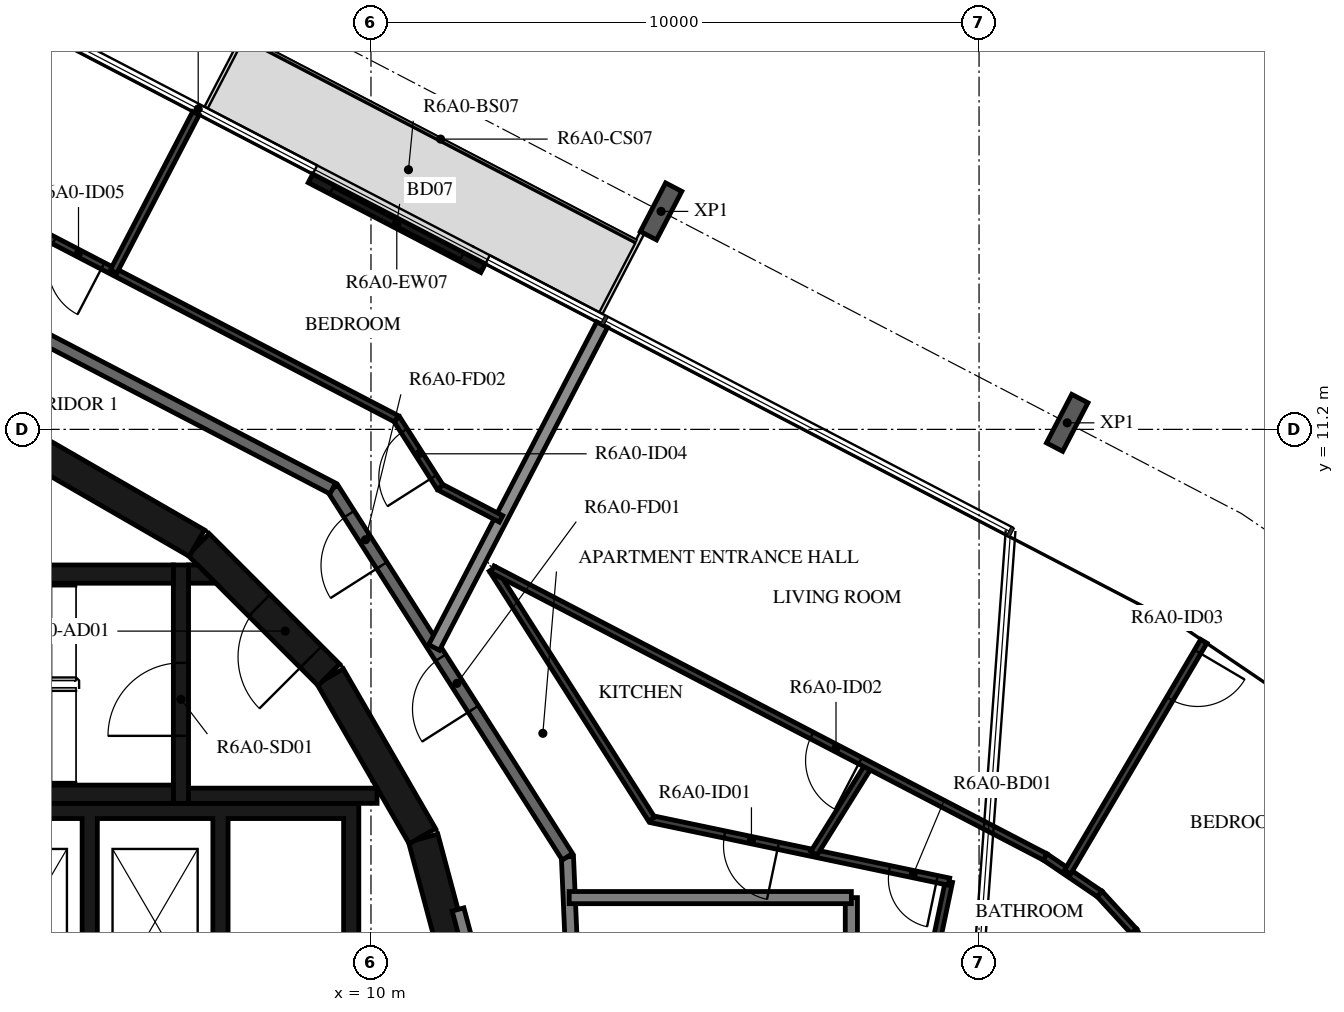
"""IFC4 building model, lengths in metres.
Left out: names, types, materials, properties, quantities, classifications, styles, units other than length and angle.
Written with IfcOpenShell. Run it as: python <this file> out.ifc"""

import sys

from ifc_helpers import new_model, si_unit, direction, frame, frame_2d, origin, origin_2d, place, context, subcontext, project, spatial, polyline, rectangle, i_section, outline, extrude, element, fill, save


model = new_model("IFC4")
c1 = context("Model", 3, precision=1e-05, world=origin(), true_north=direction((0.0, 1.0)))
c2 = subcontext(c1, "Body", "Model", "MODEL_VIEW")
j1 = project(units=[si_unit("LENGTHUNIT", "METRE"), si_unit("PLANEANGLEUNIT", "RADIAN")], contexts=[c1])
p1 = place(None, origin())
s1 = spatial("IfcSite", under=j1, at=p1, CompositionType="ELEMENT")
p2 = place(p1, origin())
s2 = spatial("IfcBuilding", under=s1, at=p2, CompositionType="ELEMENT")
p3 = place(p2, frame((0.0, 0.0, 233.7)))
s3 = spatial("IfcBuildingStorey", under=s2, at=p3, CompositionType="ELEMENT", Elevation=233.7)
for number, where, z_axis, x_axis in (
    (1, (21.45, 11.308, -0.38), (0.0, 0.0, 1.0), (0.887, -0.462, 0.0)),
    (2, (14.771, 14.784, -0.38), (0.0, 0.0, 1.0), (0.887, -0.462, 0.0)),
):
    element("IfcColumn", number, at=place(p3, frame(where, z_axis=z_axis, x_axis=x_axis)), inside=s3, PredefinedType="COLUMN", context=c2, shape_type="SweptSolid", body=[
        extrude(i_section(OverallWidth=0.3, OverallDepth=0.9, WebThickness=0.019, FlangeThickness=0.035, FilletRadius=0.03, at=origin_2d()), origin(), (0.0, 0.0, 1.0), 3.5),
    ])
p4 = place(p3, frame((11.844, 13.851, 0.0), z_axis=(0.0, 0.0, 1.0), x_axis=(-0.887014349583, 0.461741858221, 0.0)))
e3 = element("IfcWall", 3, at=p4, inside=s3, PredefinedType="STANDARD", context=c2, shape_type="SweptSolid", body=[
    extrude(rectangle(XDim=3.2, YDim=0.16, at=frame_2d((1.6, 0.0))), origin(), (0.0, 0.0, 1.0), 3.12),
])
p5 = place(p4, frame((0.4, 0.0, 0.0)))
e4 = element("IfcOpeningElement", 4, at=p5, cuts=e3, PredefinedType="OPENING", context=c2, shape_type="SweptSolid", body=[
    extrude(rectangle(XDim=2.4, YDim=2.4, at=frame_2d((1.2, 1.2))), frame((0.0, 0.09, 0.0), z_axis=(0.0, -1.0, 0.0), x_axis=(1.0, 0.0, 0.0)), (0.0, 0.0, 1.0), 0.18),
])
for number, where, z_axis, x_axis in (
    (5, (11.643, 1.55, 0.0), (0.0, 0.0, 1.0), (-0.259, 0.966, 0.0)),
    (6, (10.845, 4.51, 0.0), (0.0, 0.0, 1.0), (-0.5, 0.866, 0.0)),
):
    element("IfcWall", number, at=place(p3, frame(where, z_axis=z_axis, x_axis=x_axis)), inside=s3, PredefinedType="SHEAR", context=c2, shape_type="SweptSolid", body=[
        extrude(rectangle(XDim=3.033, YDim=0.5, at=frame_2d((1.516, 0.0))), origin(), (0.0, 0.0, 1.0), 3.12),
    ])
p6 = place(p3, frame((9.308, 7.164, 0.0), z_axis=(0.0, 0.0, 1.0), x_axis=(-0.707106781187, 0.707106781187, 0.0)))
e7 = element("IfcWall", 7, at=p6, inside=s3, PredefinedType="SHEAR", context=c2, shape_type="SweptSolid", body=[
    extrude(rectangle(XDim=3.032, YDim=0.5, at=frame_2d((1.516, 0.0))), origin(), (0.0, 0.0, 1.0), 3.12),
])
p7 = place(p6, frame((0.416, 0.0, 0.0)))
e8 = element("IfcOpeningElement", 8, at=p7, cuts=e7, PredefinedType="OPENING", context=c2, shape_type="SweptSolid", body=[
    extrude(rectangle(XDim=1.2, YDim=2.1, at=frame_2d((0.6, 1.05))), frame((0.0, 0.26, 0.0), z_axis=(0.0, -1.0, 0.0), x_axis=(1.0, 0.0, 0.0)), (0.0, 0.0, 1.0), 0.52),
])
p8 = place(p3, frame((7.137, 9.329, 0.0), z_axis=(0.0, 0.0, 1.0), x_axis=(-0.865975092491, 0.500087131594, 0.0)))
e9 = element("IfcWall", 9, at=p8, inside=s3, PredefinedType="SHEAR", context=c2, shape_type="SweptSolid", body=[
    extrude(rectangle(XDim=3.033, YDim=0.5, at=frame_2d((1.516, 0.0))), origin(), (0.0, 0.0, 1.0), 3.12),
])
for number, where, z_axis, x_axis in (
    (10, (0.0, 5.2, 0.0), (0.0, 0.0, 1.0), (1.0, 0.0, 0.0)),
    (11, (0.0, 8.82, 0.0), (0.0, 0.0, 1.0), (1.0, 0.0, 0.0)),
):
    element("IfcWall", number, at=place(p3, frame(where, z_axis=z_axis, x_axis=x_axis)), inside=s3, PredefinedType="SHEAR", context=c2, shape_type="SweptSolid", body=[
        extrude(rectangle(XDim=6.75, YDim=0.3, at=frame_2d((3.375, 0.0))), origin(), (0.0, 0.0, 1.0), 3.12),
    ])
p9 = place(p3, frame((6.875, 5.05, 0.0), z_axis=(0.0, 0.0, 1.0), x_axis=(0.0, 1.0, 0.0)))
e12 = element("IfcWall", 12, at=p9, inside=s3, PredefinedType="SHEAR", context=c2, shape_type="SweptSolid", body=[
    extrude(rectangle(XDim=3.92, YDim=0.25, at=frame_2d((1.96, 0.0))), origin(), (0.0, 0.0, 1.0), 3.12),
])
p10 = place(p9, frame((1.11, 0.0, 0.0)))
e13 = element("IfcOpeningElement", 13, at=p10, cuts=e12, PredefinedType="OPENING", context=c2, shape_type="SweptSolid", body=[
    extrude(rectangle(XDim=1.2, YDim=2.1, at=frame_2d((0.6, 1.05))), frame((0.0, 0.135, 0.0), z_axis=(0.0, -1.0, 0.0), x_axis=(1.0, 0.0, 0.0)), (0.0, 0.0, 1.0), 0.27),
])
p11 = place(p3, frame((7.0, 5.175, 0.0), z_axis=(0.0, 0.0, 1.0), x_axis=(1.0, 0.0, 0.0)))
e14 = element("IfcWall", 14, at=p11, inside=s3, PredefinedType="SHEAR", context=c2, shape_type="SweptSolid", body=[
    extrude(rectangle(XDim=3.1, YDim=0.25, at=frame_2d((1.55, 0.0))), origin(), (0.0, 0.0, 1.0), 3.12),
])
p12 = place(p3, origin())
e15 = element("IfcWall", 15, at=p12, inside=s3, PredefinedType="SHEAR", context=c2, shape_type="SweptSolid", body=[
    extrude(outline(polyline([(7.448, 8.67), (7.0, 8.67), (7.0, 8.97), (7.148, 8.97), (7.448, 8.67)])), origin(), (0.0, 0.0, 1.0), 3.12),
])
p13 = place(p3, origin())
e16 = element("IfcWall", 16, at=p13, inside=s3, PredefinedType="SHEAR", context=c2, shape_type="SweptSolid", body=[
    extrude(outline(polyline([(-9.55, 4.8), (-5.5, 4.8), (-5.5, 1.9), (-5.25, 1.9), (-5.25, 4.8), (-1.2, 4.8), (-1.2, 1.9), (-0.95, 1.9), (-0.95, 4.8), (0.95, 4.8), (0.95, 1.9), (1.2, 1.9), (1.2, 4.8), (3.1, 4.8), (3.1, 1.9), (3.35, 1.9), (3.35, 4.8), (5.25, 4.8), (5.25, 1.9), (5.5, 1.9), (5.5, 4.8), (7.4, 4.8), (7.4, 1.9), (7.65, 1.9), (7.65, 4.8), (9.55, 4.8), (9.55, 1.9), (9.8, 1.9), (9.8, 4.8), (9.8, 5.05), (-9.8, 5.05), (-9.8, 4.8), (-9.8, 1.9), (-9.55, 1.9), (-9.55, 4.8)])), origin(), (0.0, 0.0, 1.0), 3.12),
])
p14 = place(p3, frame((11.87, 1.668, 0.0), z_axis=(0.0, 0.0, 1.0), x_axis=(-0.258836880648, 0.965921047093, 0.0)))
e17 = element("IfcWall", 17, at=p14, inside=s3, PredefinedType="STANDARD", context=c2, shape_type="SweptSolid", body=[
    extrude(rectangle(XDim=1.695, YDim=0.2, at=frame_2d((0.848, 0.0))), origin(), (0.0, 0.0, 1.0), 3.12),
])
p15 = place(p3, frame((13.331, 1.874, 0.0), z_axis=(0.0, 0.0, 1.0), x_axis=(-0.043621457762, 0.999048131184, 0.0)))
e18 = element("IfcWall", 18, at=p15, inside=s3, PredefinedType="STANDARD", context=c2, shape_type="SweptSolid", body=[
    extrude(rectangle(XDim=2.3, YDim=0.2, at=frame_2d((1.15, 0.0))), origin(), (0.0, 0.0, 1.0), 3.12),
])
p16 = place(p3, frame((13.231, 4.172, 0.0), z_axis=(0.0, 0.0, 1.0), x_axis=(-0.537304397561, 0.843388394728, 0.0)))
e19 = element("IfcWall", 19, at=p16, inside=s3, PredefinedType="STANDARD", context=c2, shape_type="SweptSolid", body=[
    extrude(rectangle(XDim=7.181, YDim=0.2, at=frame_2d((3.59, 0.0))), origin(), (0.0, 0.0, 1.0), 3.12),
])
p17 = place(p16, frame((2.881, 0.0, 0.0)))
e20 = element("IfcOpeningElement", 20, at=p17, cuts=e19, PredefinedType="OPENING", context=c2, shape_type="SweptSolid", body=[
    extrude(rectangle(XDim=1.0, YDim=2.1, at=frame_2d((0.5, 1.05))), frame((0.0, 0.11, 0.0), z_axis=(0.0, -1.0, 0.0), x_axis=(1.0, 0.0, 0.0)), (0.0, 0.0, 1.0), 0.22),
])
p18 = place(p16, frame((5.681, 0.0, 0.0)))
e21 = element("IfcOpeningElement", 21, at=p18, cuts=e19, PredefinedType="OPENING", context=c2, shape_type="SweptSolid", body=[
    extrude(rectangle(XDim=1.0, YDim=2.1, at=frame_2d((0.5, 1.05))), frame((0.0, 0.11, 0.0), z_axis=(0.0, -1.0, 0.0), x_axis=(1.0, 0.0, 0.0)), (0.0, 0.0, 1.0), 0.22),
])
p19 = place(p3, frame((9.372, 10.228, 0.0), z_axis=(0.0, 0.0, 1.0), x_axis=(-0.887005184532, 0.461759464021, 0.0)))
e22 = element("IfcWall", 22, at=p19, inside=s3, PredefinedType="STANDARD", context=c2, shape_type="SweptSolid", body=[
    extrude(rectangle(XDim=7.181, YDim=0.2, at=frame_2d((3.591, 0.0))), origin(), (0.0, 0.0, 1.0), 3.12),
])
p20 = place(p3, frame((17.9, -1.772, 0.0), z_axis=(0.0, 0.0, 1.0), x_axis=(0.0, 1.0, 0.0)))
e23 = element("IfcWall", 23, at=p20, inside=s3, PredefinedType="STANDARD", context=c2, shape_type="SweptSolid", body=[
    extrude(rectangle(XDim=5.272, YDim=0.2, at=frame_2d((2.636, 0.0))), origin(), (0.0, 0.0, 1.0), 3.12),
])
p21 = place(p3, frame((17.9, 3.5, 0.0), z_axis=(0.0, 0.0, 1.0), x_axis=(-1.0, 0.0, 0.0)))
e24 = element("IfcWall", 24, at=p21, inside=s3, PredefinedType="STANDARD", context=c2, shape_type="SweptSolid", body=[
    extrude(rectangle(XDim=4.64, YDim=0.2, at=frame_2d((2.32, 0.0))), origin(), (0.0, 0.0, 1.0), 3.12),
])
p22 = place(p3, frame((13.801, 12.922, 0.0), z_axis=(0.0, 0.0, 1.0), x_axis=(-0.461726485624, -0.887022351733, 0.0)))
e25 = element("IfcWall", 25, at=p22, inside=s3, PredefinedType="STANDARD", context=c2, shape_type="SweptSolid", body=[
    extrude(rectangle(XDim=5.984, YDim=0.2, at=frame_2d((2.992, 0.0))), origin(), (0.0, 0.0, 1.0), 2.73),
])
p23 = place(p3, frame((19.199, 2.308, 0.0), z_axis=(0.0, 0.0, 1.0), x_axis=(0.205580140246, 0.978640284239, 0.0)))
e26 = element("IfcWall", 26, at=p23, inside=s3, PredefinedType="PARTITIONING", context=c2, shape_type="SweptSolid", body=[
    extrude(rectangle(XDim=1.487, YDim=0.12, at=frame_2d((0.743, 0.0))), origin(), (0.0, 0.0, 1.0), 3.12),
])
p24 = place(p3, frame((19.505, 3.763, 0.0), z_axis=(0.0, 0.0, 1.0), x_axis=(-0.978660081285, 0.205485876157, 0.0)))
e27 = element("IfcWall", 27, at=p24, inside=s3, PredefinedType="PARTITIONING", context=c2, shape_type="SweptSolid", body=[
    extrude(rectangle(XDim=4.996, YDim=0.12, at=frame_2d((2.498, 0.0))), origin(), (0.0, 0.0, 1.0), 3.12),
])
p25 = place(p24, frame((0.2, 0.0, 0.0)))
e28 = element("IfcOpeningElement", 28, at=p25, cuts=e27, PredefinedType="OPENING", context=c2, shape_type="SweptSolid", body=[
    extrude(rectangle(XDim=0.8, YDim=2.1, at=frame_2d((0.4, 1.05))), frame((0.0, 0.07, 0.0), z_axis=(0.0, -1.0, 0.0), x_axis=(1.0, 0.0, 0.0)), (0.0, 0.0, 1.0), 0.14),
])
p26 = place(p24, frame((2.869, 0.0, 0.0)))
e29 = element("IfcOpeningElement", 29, at=p26, cuts=e27, PredefinedType="OPENING", context=c2, shape_type="SweptSolid", body=[
    extrude(rectangle(XDim=0.9, YDim=2.1, at=frame_2d((0.45, 1.05))), frame((0.0, 0.07, 0.0), z_axis=(0.0, -1.0, 0.0), x_axis=(1.0, 0.0, 0.0)), (0.0, 0.0, 1.0), 0.14),
])
p27 = place(p3, frame((14.615, 4.79, 0.0), z_axis=(0.0, 0.0, 1.0), x_axis=(-0.537312928062, 0.843382960071, 0.0)))
e30 = element("IfcWall", 30, at=p27, inside=s3, PredefinedType="PARTITIONING", context=c2, shape_type="SweptSolid", body=[
    extrude(rectangle(XDim=4.875, YDim=0.12, at=frame_2d((2.437, 0.0))), origin(), (0.0, 0.0, 1.0), 3.12),
])
p28 = place(p3, frame((21.085, 4.169, 0.0), z_axis=(0.0, 0.0, 1.0), x_axis=(0.827390024541, -0.561627765776, 0.0)))
e31 = element("IfcWall", 31, at=p28, inside=s3, PredefinedType="PARTITIONING", context=c2, shape_type="SweptSolid", body=[
    extrude(rectangle(XDim=1.087, YDim=0.12, at=frame_2d((0.543, 0.0))), origin(), (0.0, 0.0, 1.0), 3.12),
])
p29 = place(p3, frame((21.984, 3.559, 0.0), z_axis=(0.0, 0.0, 1.0), x_axis=(0.675497816835, -0.737361986715, 0.0)))
e32 = element("IfcWall", 32, at=p29, inside=s3, PredefinedType="PARTITIONING", context=c2, shape_type="SweptSolid", body=[
    extrude(rectangle(XDim=0.829, YDim=0.12, at=frame_2d((0.415, 0.0))), origin(), (0.0, 0.0, 1.0), 3.12),
])
p30 = place(p3, frame((22.544, 2.948, 0.0), z_axis=(0.0, 0.0, 1.0), x_axis=(0.487392269075, -0.873183128585, 0.0)))
e33 = element("IfcWall", 33, at=p30, inside=s3, PredefinedType="PARTITIONING", context=c2, shape_type="SweptSolid", body=[
    extrude(rectangle(XDim=0.829, YDim=0.12, at=frame_2d((0.415, 0.0))), origin(), (0.0, 0.0, 1.0), 3.12),
])
p31 = place(p3, frame((23.696, 7.715, 0.0), z_axis=(0.0, 0.0, 1.0), x_axis=(-0.508219920645, -0.861227329025, 0.0)))
e34 = element("IfcWall", 34, at=p31, inside=s3, PredefinedType="PARTITIONING", context=c2, shape_type="SweptSolid", body=[
    extrude(rectangle(XDim=4.409, YDim=0.12, at=frame_2d((2.205, 0.0))), origin(), (0.0, 0.0, 1.0), 3.12),
])
p32 = place(p31, frame((0.2, 0.0, 0.0)))
e35 = element("IfcOpeningElement", 35, at=p32, cuts=e34, PredefinedType="OPENING", context=c2, shape_type="SweptSolid", body=[
    extrude(rectangle(XDim=0.9, YDim=2.1, at=frame_2d((0.45, 1.05))), frame((0.0, 0.07, 0.0), z_axis=(0.0, -1.0, 0.0), x_axis=(1.0, 0.0, 0.0)), (0.0, 0.0, 1.0), 0.14),
])
p33 = place(p3, frame((18.189, 5.677, 0.0), z_axis=(0.0, 0.0, 1.0), x_axis=(-0.529639004581, -0.848223157445, 0.0)))
e36 = element("IfcWall", 36, at=p33, inside=s3, PredefinedType="PARTITIONING", context=c2, shape_type="SweptSolid", body=[
    extrude(rectangle(XDim=1.707, YDim=0.12, at=frame_2d((0.854, 0.0))), origin(), (0.0, 0.0, 1.0), 3.12),
])
p34 = place(p3, frame((21.085, 4.169, 0.0), z_axis=(0.0, 0.0, 1.0), x_axis=(-0.887017373034, 0.461736050071, 0.0)))
e37 = element("IfcWall", 37, at=p34, inside=s3, PredefinedType="PARTITIONING", context=c2, shape_type="SweptSolid", body=[
    extrude(rectangle(XDim=10.247, YDim=0.12, at=frame_2d((5.123, 0.0))), origin(), (0.0, 0.0, 1.0), 3.12),
])
p35 = place(p34, frame((3.425, 0.0, 0.0)))
e38 = element("IfcOpeningElement", 38, at=p35, cuts=e37, PredefinedType="OPENING", context=c2, shape_type="SweptSolid", body=[
    extrude(rectangle(XDim=0.9, YDim=2.1, at=frame_2d((0.45, 1.05))), frame((0.0, 0.07, 0.0), z_axis=(0.0, -1.0, 0.0), x_axis=(1.0, 0.0, 0.0)), (0.0, 0.0, 1.0), 0.14),
])
p36 = place(p3, frame((12.139, 9.729, 0.0), z_axis=(0.0, 0.0, 1.0), x_axis=(-0.887046876331, 0.461679368383, 0.0)))
e39 = element("IfcWall", 39, at=p36, inside=s3, PredefinedType="PARTITIONING", context=c2, shape_type="SweptSolid", body=[
    extrude(rectangle(XDim=1.13, YDim=0.12, at=frame_2d((0.565, 0.0))), origin(), (0.0, 0.0, 1.0), 3.12),
])
p37 = place(p3, frame((11.137, 10.25, 0.0), z_axis=(0.0, 0.0, 1.0), x_axis=(-0.537231369635, 0.843434914786, 0.0)))
e40 = element("IfcWall", 40, at=p37, inside=s3, PredefinedType="PARTITIONING", context=c2, shape_type="SweptSolid", body=[
    extrude(rectangle(XDim=1.332, YDim=0.12, at=frame_2d((0.666, 0.0))), origin(), (0.0, 0.0, 1.0), 3.12),
])
p38 = place(p37, frame((0.2, 0.0, 0.0)))
e41 = element("IfcOpeningElement", 41, at=p38, cuts=e40, PredefinedType="OPENING", context=c2, shape_type="SweptSolid", body=[
    extrude(rectangle(XDim=0.9, YDim=2.1, at=frame_2d((0.45, 1.05))), frame((0.0, 0.07, 0.0), z_axis=(0.0, -1.0, 0.0), x_axis=(1.0, 0.0, 0.0)), (0.0, 0.0, 1.0), 0.14),
])
p39 = place(p3, frame((10.421, 11.373, 0.0), z_axis=(0.0, 0.0, 1.0), x_axis=(-0.887012970857, 0.461744506769, 0.0)))
e42 = element("IfcWall", 42, at=p39, inside=s3, PredefinedType="PARTITIONING", context=c2, shape_type="SweptSolid", body=[
    extrude(rectangle(XDim=7.985, YDim=0.12, at=frame_2d((3.992, 0.0))), origin(), (0.0, 0.0, 1.0), 3.12),
])
p40 = place(p39, frame((5.448, 0.0, 0.0)))
e43 = element("IfcOpeningElement", 43, at=p40, cuts=e42, PredefinedType="OPENING", context=c2, shape_type="SweptSolid", body=[
    extrude(rectangle(XDim=0.9, YDim=2.1, at=frame_2d((0.45, 1.05))), frame((0.0, 0.07, 0.0), z_axis=(0.0, -1.0, 0.0), x_axis=(1.0, 0.0, 0.0)), (0.0, 0.0, 1.0), 0.14),
])
p41 = place(p3, frame((7.122, 16.399, 0.0), z_axis=(0.0, 0.0, 1.0), x_axis=(-0.461763975246, -0.887002836053, 0.0)))
e44 = element("IfcWall", 44, at=p41, inside=s3, PredefinedType="PARTITIONING", context=c2, shape_type="SweptSolid", body=[
    extrude(rectangle(XDim=2.934, YDim=0.12, at=frame_2d((1.467, 0.0))), origin(), (0.0, 0.0, 1.0), 2.73),
])
p42 = place(p5, origin())
e45 = element("IfcDoor", 45, at=p42, inside=s3, OperationType="DOUBLE_DOOR_SLIDING", PredefinedType="DOOR", context=c2, shape_type="SweptSolid", body=[
    extrude(rectangle(XDim=2.4, YDim=2.4, at=frame_2d((1.2, 1.2))), frame((0.0, 0.025, 0.0), z_axis=(0.0, -1.0, 0.0), x_axis=(1.0, 0.0, 0.0)), (0.0, 0.0, 1.0), 0.05),
])
fill(e4, e45)
p43 = place(p10, origin())
e46 = element("IfcDoor", 46, at=p43, inside=s3, OperationType="SINGLE_SWING_LEFT", PredefinedType="DOOR", context=c2, shape_type="SweptSolid", body=[
    extrude(rectangle(XDim=1.2, YDim=2.1, at=frame_2d((0.6, 1.05))), frame((0.0, 0.025, 0.0), z_axis=(0.0, -1.0, 0.0), x_axis=(1.0, 0.0, 0.0)), (0.0, 0.0, 1.0), 0.05),
])
fill(e13, e46)
p44 = place(p7, origin())
e47 = element("IfcDoor", 47, at=p44, inside=s3, OperationType="SINGLE_SWING_RIGHT", PredefinedType="DOOR", context=c2, shape_type="SweptSolid", body=[
    extrude(rectangle(XDim=1.2, YDim=2.1, at=frame_2d((0.6, 1.05))), frame((0.0, 0.025, 0.0), z_axis=(0.0, -1.0, 0.0), x_axis=(1.0, 0.0, 0.0)), (0.0, 0.0, 1.0), 0.05),
])
fill(e8, e47)
p45 = place(p17, origin())
e48 = element("IfcDoor", 48, at=p45, inside=s3, OperationType="SINGLE_SWING_LEFT", PredefinedType="DOOR", context=c2, shape_type="SweptSolid", body=[
    extrude(rectangle(XDim=1.0, YDim=2.1, at=frame_2d((0.5, 1.05))), frame((0.0, 0.025, 0.0), z_axis=(0.0, -1.0, 0.0), x_axis=(1.0, 0.0, 0.0)), (0.0, 0.0, 1.0), 0.05),
])
fill(e20, e48)
p46 = place(p25, origin())
e49 = element("IfcDoor", 49, at=p46, inside=s3, OperationType="SINGLE_SWING_LEFT", PredefinedType="DOOR", context=c2, shape_type="SweptSolid", body=[
    extrude(rectangle(XDim=0.8, YDim=2.1, at=frame_2d((0.4, 1.05))), frame((0.0, 0.025, 0.0), z_axis=(0.0, -1.0, 0.0), x_axis=(1.0, 0.0, 0.0)), (0.0, 0.0, 1.0), 0.05),
])
fill(e28, e49)
p47 = place(p26, origin())
e50 = element("IfcDoor", 50, at=p47, inside=s3, OperationType="SINGLE_SWING_LEFT", PredefinedType="DOOR", context=c2, shape_type="SweptSolid", body=[
    extrude(rectangle(XDim=0.9, YDim=2.1, at=frame_2d((0.45, 1.05))), frame((0.0, 0.025, 0.0), z_axis=(0.0, -1.0, 0.0), x_axis=(1.0, 0.0, 0.0)), (0.0, 0.0, 1.0), 0.05),
])
fill(e29, e50)
p48 = place(p35, origin())
e51 = element("IfcDoor", 51, at=p48, inside=s3, OperationType="SINGLE_SWING_LEFT", PredefinedType="DOOR", context=c2, shape_type="SweptSolid", body=[
    extrude(rectangle(XDim=0.9, YDim=2.1, at=frame_2d((0.45, 1.05))), frame((0.0, 0.025, 0.0), z_axis=(0.0, -1.0, 0.0), x_axis=(1.0, 0.0, 0.0)), (0.0, 0.0, 1.0), 0.05),
])
fill(e38, e51)
p49 = place(p32, origin())
e52 = element("IfcDoor", 52, at=p49, inside=s3, OperationType="SINGLE_SWING_LEFT", PredefinedType="DOOR", context=c2, shape_type="SweptSolid", body=[
    extrude(rectangle(XDim=0.9, YDim=2.1, at=frame_2d((0.45, 1.05))), frame((0.0, 0.025, 0.0), z_axis=(0.0, -1.0, 0.0), x_axis=(1.0, 0.0, 0.0)), (0.0, 0.0, 1.0), 0.05),
])
fill(e35, e52)
p50 = place(p18, origin())
e53 = element("IfcDoor", 53, at=p50, inside=s3, OperationType="SINGLE_SWING_LEFT", PredefinedType="DOOR", context=c2, shape_type="SweptSolid", body=[
    extrude(rectangle(XDim=1.0, YDim=2.1, at=frame_2d((0.5, 1.05))), frame((0.0, 0.025, 0.0), z_axis=(0.0, -1.0, 0.0), x_axis=(1.0, 0.0, 0.0)), (0.0, 0.0, 1.0), 0.05),
])
fill(e21, e53)
p51 = place(p38, origin())
e54 = element("IfcDoor", 54, at=p51, inside=s3, OperationType="SINGLE_SWING_LEFT", PredefinedType="DOOR", context=c2, shape_type="SweptSolid", body=[
    extrude(rectangle(XDim=0.9, YDim=2.1, at=frame_2d((0.45, 1.05))), frame((0.0, 0.025, 0.0), z_axis=(0.0, -1.0, 0.0), x_axis=(1.0, 0.0, 0.0)), (0.0, 0.0, 1.0), 0.05),
])
fill(e41, e54)
p52 = place(p40, origin())
e55 = element("IfcDoor", 55, at=p52, inside=s3, OperationType="SINGLE_SWING_RIGHT", PredefinedType="DOOR", context=c2, shape_type="SweptSolid", body=[
    extrude(rectangle(XDim=0.9, YDim=2.1, at=frame_2d((0.45, 1.05))), frame((0.0, 0.025, 0.0), z_axis=(0.0, -1.0, 0.0), x_axis=(1.0, 0.0, 0.0)), (0.0, 0.0, 1.0), 0.05),
])
fill(e43, e55)
save(model, sys.argv[1])
